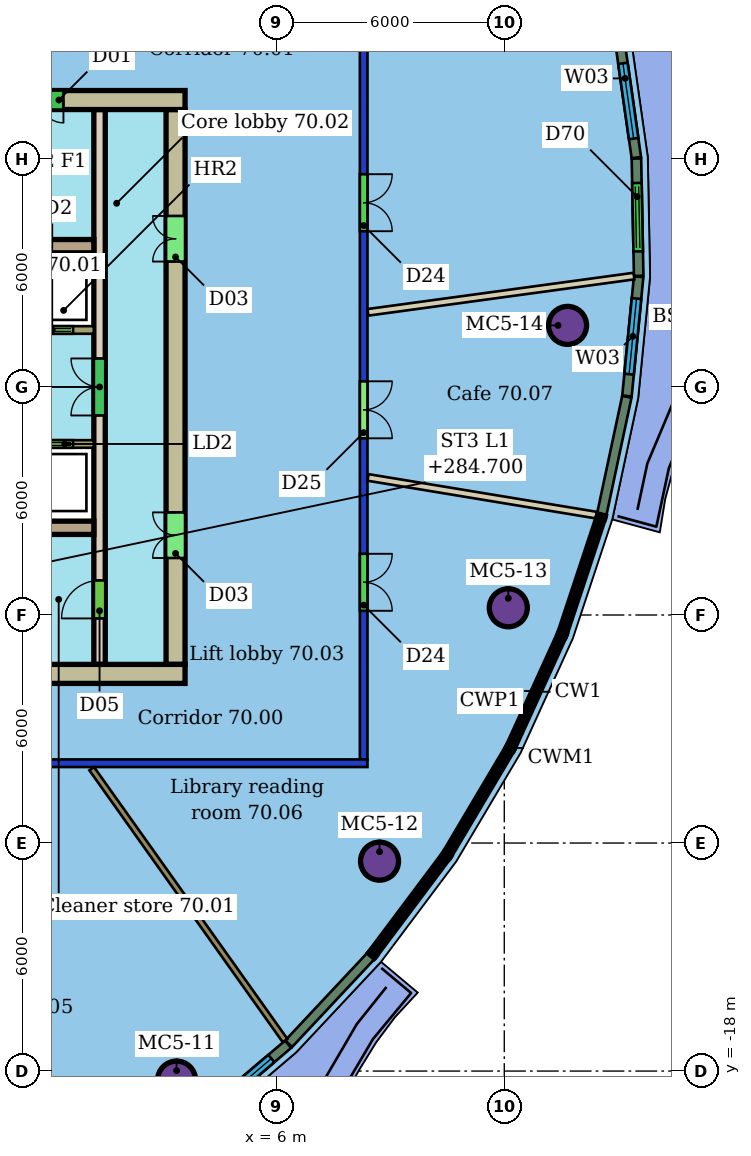
"""IFC4 building model, lengths in metres.
Left out: names, types, materials, properties, quantities, classifications, styles, units other than length and angle.
Written with IfcOpenShell. Run it as: python <this file> out.ifc"""

import sys

from ifc_helpers import new_model, si_unit, direction, frame, frame_2d, origin, origin_2d, place, context, subcontext, project, spatial, rectangle, hollow_circle, extrude, element, fill, save


model = new_model("IFC4")
c1 = context("Model", 3, precision=1e-05, world=origin(), true_north=direction((0.0, 1.0)))
c2 = subcontext(c1, "Body", "Model", "MODEL_VIEW")
j1 = project(units=[si_unit("LENGTHUNIT", "METRE"), si_unit("PLANEANGLEUNIT", "RADIAN")], contexts=[c1])
p1 = place(None, origin())
s1 = spatial("IfcSite", under=j1, at=p1, CompositionType="ELEMENT")
p2 = place(p1, origin())
s2 = spatial("IfcBuilding", under=s1, at=p2, CompositionType="ELEMENT")
p3 = place(p2, frame((0.0, 0.0, 282.9)))
s3 = spatial("IfcBuildingStorey", under=s2, at=p3, CompositionType="ELEMENT", Elevation=282.9)
for number, where, z_axis, x_axis in (
    (1, (3.377, -18.238, 0.0), (0.0, 0.0, 1.0), (1.0, 0.0, 0.0)),
    (2, (8.718, -12.477, 0.0), (0.0, 0.0, 1.0), (1.0, 0.0, 0.0)),
    (3, (12.106, -5.81, 0.0), (0.0, 0.0, 1.0), (1.0, 0.0, 0.0)),
    (4, (13.666, 1.62, 0.0), (0.0, 0.0, 1.0), (1.0, 0.0, 0.0)),
):
    element("IfcColumn", number, at=place(p3, frame(where, z_axis=z_axis, x_axis=x_axis)), inside=s3, PredefinedType="COLUMN", context=c2, shape_type="SweptSolid", body=[
        extrude(hollow_circle(Radius=0.5, WallThickness=0.04, at=origin_2d()), origin(), (0.0, 0.0, 1.0), 3.45),
    ])
p4 = place(p3, frame((8.4, -9.9, 0.0), z_axis=(0.0, 0.0, 1.0), x_axis=(-1.0, 0.0, 0.0)))
e5 = element("IfcWall", 5, at=p4, inside=s3, PredefinedType="PARTITIONING", context=c2, shape_type="SweptSolid", body=[
    extrude(rectangle(XDim=28.8, YDim=0.2, at=frame_2d((14.4, 0.0))), origin(), (0.0, 0.0, 1.0), 3.1),
])
p5 = place(p4, frame((17.579, 0.0, 0.0)))
e6 = element("IfcOpeningElement", 6, at=p5, cuts=e5, PredefinedType="OPENING", context=c2, shape_type="SweptSolid", body=[
    extrude(rectangle(XDim=1.5, YDim=2.4, at=frame_2d((0.75, 1.2))), frame((0.0, 0.11, 0.0), z_axis=(0.0, -1.0, 0.0), x_axis=(1.0, 0.0, 0.0)), (0.0, 0.0, 1.0), 0.22),
])
p6 = place(p4, frame((9.185, 0.0, 0.0)))
e7 = element("IfcOpeningElement", 7, at=p6, cuts=e5, PredefinedType="OPENING", context=c2, shape_type="SweptSolid", body=[
    extrude(rectangle(XDim=1.8, YDim=2.4, at=frame_2d((0.9, 1.2))), frame((0.0, 0.11, 0.0), z_axis=(0.0, -1.0, 0.0), x_axis=(1.0, 0.0, 0.0)), (0.0, 0.0, 1.0), 0.22),
])
p7 = place(p3, frame((8.3, 9.8, 0.0), z_axis=(0.0, 0.0, 1.0), x_axis=(0.0, -1.0, 0.0)))
e8 = element("IfcWall", 8, at=p7, inside=s3, PredefinedType="PARTITIONING", context=c2, shape_type="SweptSolid", body=[
    extrude(rectangle(XDim=19.6, YDim=0.2, at=frame_2d((9.8, 0.0))), origin(), (0.0, 0.0, 1.0), 3.1),
])
p8 = place(p7, frame((14.189, 0.0, 0.0)))
e9 = element("IfcOpeningElement", 9, at=p8, cuts=e8, PredefinedType="OPENING", context=c2, shape_type="SweptSolid", body=[
    extrude(rectangle(XDim=1.5, YDim=2.1, at=frame_2d((0.75, 1.05))), frame((0.0, 0.11, 0.0), z_axis=(0.0, -1.0, 0.0), x_axis=(1.0, 0.0, 0.0)), (0.0, 0.0, 1.0), 0.22),
])
p9 = place(p7, frame((9.651, 0.0, 0.0)))
e10 = element("IfcOpeningElement", 10, at=p9, cuts=e8, PredefinedType="OPENING", context=c2, shape_type="SweptSolid", body=[
    extrude(rectangle(XDim=1.5, YDim=2.4, at=frame_2d((0.75, 1.2))), frame((0.0, 0.11, 0.0), z_axis=(0.0, -1.0, 0.0), x_axis=(1.0, 0.0, 0.0)), (0.0, 0.0, 1.0), 0.22),
])
p10 = place(p7, frame((4.201, 0.0, 0.0)))
e11 = element("IfcOpeningElement", 11, at=p10, cuts=e8, PredefinedType="OPENING", context=c2, shape_type="SweptSolid", body=[
    extrude(rectangle(XDim=1.5, YDim=2.1, at=frame_2d((0.75, 1.05))), frame((0.0, 0.11, 0.0), z_axis=(0.0, -1.0, 0.0), x_axis=(1.0, 0.0, 0.0)), (0.0, 0.0, 1.0), 0.22),
])
p11 = place(p3, frame((6.232, -17.198, 0.0), z_axis=(0.0, 0.0, 1.0), x_axis=(-0.579606269786, 0.814896663402, 0.0)))
e12 = element("IfcWall", 12, at=p11, inside=s3, PredefinedType="PARTITIONING", context=c2, shape_type="SweptSolid", body=[
    extrude(rectangle(XDim=8.78, YDim=0.15, at=frame_2d((4.39, 0.0))), origin(), (0.0, 0.0, 1.0), 3.45),
])
p12 = place(p3, frame((14.432, -3.374, 0.0), z_axis=(0.0, 0.0, 1.0), x_axis=(-0.986640542302, 0.162912369961, 0.0)))
e13 = element("IfcWall", 13, at=p12, inside=s3, PredefinedType="PARTITIONING", context=c2, shape_type="SweptSolid", body=[
    extrude(rectangle(XDim=6.099, YDim=0.175, at=frame_2d((3.05, 0.0))), origin(), (0.0, 0.0, 1.0), 3.45),
])
p13 = place(p3, frame((15.412, 2.918, 0.0), z_axis=(0.0, 0.0, 1.0), x_axis=(-0.99084383144, -0.135012968627, 0.0)))
e14 = element("IfcWall", 14, at=p13, inside=s3, PredefinedType="PARTITIONING", context=c2, shape_type="SweptSolid", body=[
    extrude(rectangle(XDim=7.065, YDim=0.175, at=frame_2d((3.532, 0.0))), origin(), (0.0, 0.0, 1.0), 3.45),
])
p14 = place(p3, frame((3.908, -19.34, 0.0), z_axis=(0.0, 0.0, 1.0), x_axis=(0.761601165005, 0.64804603653, 0.0)))
e15 = element("IfcWall", 15, at=p14, inside=s3, PredefinedType="SOLIDWALL", context=c2, shape_type="SweptSolid", body=[
    extrude(rectangle(XDim=3.154, YDim=0.25, at=frame_2d((1.577, 0.0))), origin(), (0.0, 0.0, 1.0), 3.15),
])
p15 = place(p14, frame((0.577, 0.0, 0.9)))
e16 = element("IfcOpeningElement", 16, at=p15, cuts=e15, PredefinedType="OPENING", context=c2, shape_type="SweptSolid", body=[
    extrude(rectangle(XDim=2.0, YDim=2.1, at=frame_2d((1.0, 1.05))), frame((0.0, 0.135, 0.0), z_axis=(0.0, -1.0, 0.0), x_axis=(1.0, 0.0, 0.0)), (0.0, 0.0, 1.0), 0.27),
])
for number, where, z_axis, x_axis in (
    (17, (6.326, -17.281, 0.0), (0.0, 0.0, 1.0), (0.684, 0.73, 0.0)),
    (18, (14.564, -3.353, 0.0), (0.0, 0.0, 1.0), (0.209, 0.978, 0.0)),
):
    element("IfcWall", number, at=place(p3, frame(where, z_axis=z_axis, x_axis=x_axis)), inside=s3, PredefinedType="SOLIDWALL", context=c2, shape_type="SweptSolid", body=[
        extrude(rectangle(XDim=3.163, YDim=0.25, at=frame_2d((1.582, 0.0))), origin(), (0.0, 0.0, 1.0), 3.15),
    ])
p16 = place(p3, frame((15.228, -0.238, 0.0), z_axis=(0.0, 0.0, 1.0), x_axis=(0.097526326892, 0.995232945377, 0.0)))
e19 = element("IfcWall", 19, at=p16, inside=s3, PredefinedType="SOLIDWALL", context=c2, shape_type="SweptSolid", body=[
    extrude(rectangle(XDim=3.154, YDim=0.25, at=frame_2d((1.577, 0.0))), origin(), (0.0, 0.0, 1.0), 3.15),
])
p17 = place(p16, frame((0.577, 0.0, 0.9)))
e20 = element("IfcOpeningElement", 20, at=p17, cuts=e19, PredefinedType="OPENING", context=c2, shape_type="SweptSolid", body=[
    extrude(rectangle(XDim=2.0, YDim=2.1, at=frame_2d((1.0, 1.05))), frame((0.0, 0.135, 0.0), z_axis=(0.0, -1.0, 0.0), x_axis=(1.0, 0.0, 0.0)), (0.0, 0.0, 1.0), 0.27),
])
p18 = place(p3, frame((15.537, 2.924, 0.0), z_axis=(0.0, 0.0, 1.0), x_axis=(-0.019213534435, 0.999815403009, 0.0)))
e21 = element("IfcWall", 21, at=p18, inside=s3, PredefinedType="SOLIDWALL", context=c2, shape_type="SweptSolid", body=[
    extrude(rectangle(XDim=3.088, YDim=0.25, at=frame_2d((1.544, 0.0))), origin(), (0.0, 0.0, 1.0), 3.15),
])
p19 = place(p18, frame((0.644, 0.0, 0.0)))
e22 = element("IfcOpeningElement", 22, at=p19, cuts=e21, PredefinedType="OPENING", context=c2, shape_type="SweptSolid", body=[
    extrude(rectangle(XDim=1.8, YDim=2.4, at=frame_2d((0.9, 1.2))), frame((0.0, 0.135, 0.0), z_axis=(0.0, -1.0, 0.0), x_axis=(1.0, 0.0, 0.0)), (0.0, 0.0, 1.0), 0.27),
])
p20 = place(p3, frame((15.476, 6.034, 0.0), z_axis=(0.0, 0.0, 1.0), x_axis=(-0.140956080181, 0.990015850105, 0.0)))
e23 = element("IfcWall", 23, at=p20, inside=s3, PredefinedType="SOLIDWALL", context=c2, shape_type="SweptSolid", body=[
    extrude(rectangle(XDim=3.012, YDim=0.25, at=frame_2d((1.506, 0.0))), origin(), (0.0, 0.0, 1.0), 3.15),
])
p21 = place(p20, frame((0.506, 0.0, 0.9)))
e24 = element("IfcOpeningElement", 24, at=p21, cuts=e23, PredefinedType="OPENING", context=c2, shape_type="SweptSolid", body=[
    extrude(rectangle(XDim=2.0, YDim=2.1, at=frame_2d((1.0, 1.05))), frame((0.0, 0.135, 0.0), z_axis=(0.0, -1.0, 0.0), x_axis=(1.0, 0.0, 0.0)), (0.0, 0.0, 1.0), 0.27),
])
p22 = place(p3, frame((3.6, 7.55, 0.0), z_axis=(0.0, 0.0, 1.0), x_axis=(-1.0, 0.0, 0.0)))
e25 = element("IfcWall", 25, at=p22, inside=s3, PredefinedType="SHEAR", context=c2, shape_type="SweptSolid", body=[
    extrude(rectangle(XDim=9.6, YDim=0.5, at=frame_2d((4.8, 0.0))), origin(), (0.0, 0.0, 1.0), 3.3),
])
p23 = place(p22, frame((3.2, 0.0, 0.0)))
e26 = element("IfcOpeningElement", 26, at=p23, cuts=e25, PredefinedType="OPENING", context=c2, shape_type="SweptSolid", body=[
    extrude(rectangle(XDim=1.2, YDim=2.1, at=frame_2d((0.6, 1.05))), frame((0.0, 0.26, 0.0), z_axis=(0.0, -1.0, 0.0), x_axis=(1.0, 0.0, 0.0)), (0.0, 0.0, 1.0), 0.52),
])
p24 = place(p3, frame((-15.6, -7.55, 0.0), z_axis=(0.0, 0.0, 1.0), x_axis=(1.0, 0.0, 0.0)))
e27 = element("IfcWall", 27, at=p24, inside=s3, PredefinedType="SHEAR", context=c2, shape_type="SweptSolid", body=[
    extrude(rectangle(XDim=19.2, YDim=0.5, at=frame_2d((9.6, 0.0))), origin(), (0.0, 0.0, 1.0), 3.3),
])
p25 = place(p24, frame((3.6, 0.0, 0.0)))
e28 = element("IfcOpeningElement", 28, at=p25, cuts=e27, PredefinedType="OPENING", context=c2, shape_type="SweptSolid", body=[
    extrude(rectangle(XDim=1.2, YDim=2.1, at=frame_2d((0.6, 1.05))), frame((0.0, 0.26, 0.0), z_axis=(0.0, -1.0, 0.0), x_axis=(1.0, 0.0, 0.0)), (0.0, 0.0, 1.0), 0.52),
])
p26 = place(p3, frame((3.35, -7.3, 0.0), z_axis=(0.0, 0.0, 1.0), x_axis=(0.0, 1.0, 0.0)))
e29 = element("IfcWall", 29, at=p26, inside=s3, PredefinedType="SHEAR", context=c2, shape_type="SweptSolid", body=[
    extrude(rectangle(XDim=14.6, YDim=0.5, at=frame_2d((7.3, 0.0))), origin(), (0.0, 0.0, 1.0), 3.3),
])
p27 = place(p26, frame((2.8, 0.0, 0.0)))
e30 = element("IfcOpeningElement", 30, at=p27, cuts=e29, PredefinedType="OPENING", context=c2, shape_type="SweptSolid", body=[
    extrude(rectangle(XDim=1.2, YDim=2.1, at=frame_2d((0.6, 1.05))), frame((0.0, 0.26, 0.0), z_axis=(0.0, -1.0, 0.0), x_axis=(1.0, 0.0, 0.0)), (0.0, 0.0, 1.0), 0.52),
])
p28 = place(p26, frame((10.6, 0.0, 0.0)))
e31 = element("IfcOpeningElement", 31, at=p28, cuts=e29, PredefinedType="OPENING", context=c2, shape_type="SweptSolid", body=[
    extrude(rectangle(XDim=1.2, YDim=2.1, at=frame_2d((0.6, 1.05))), frame((0.0, 0.26, 0.0), z_axis=(0.0, -1.0, 0.0), x_axis=(1.0, 0.0, 0.0)), (0.0, 0.0, 1.0), 0.52),
])
for number, where, z_axis, x_axis in (
    (32, (-6.0, 3.705, 0.0), (0.0, 0.0, 1.0), (1.0, 0.0, 0.0)),
    (33, (-6.0, -3.705, 0.0), (0.0, 0.0, 1.0), (1.0, 0.0, 0.0)),
):
    element("IfcWall", number, at=place(p3, frame(where, z_axis=z_axis, x_axis=x_axis)), inside=s3, PredefinedType="SHEAR", context=c2, shape_type="SweptSolid", body=[
        extrude(rectangle(XDim=7.2, YDim=0.35, at=frame_2d((3.6, 0.0))), origin(), (0.0, 0.0, 1.0), 3.3),
    ])
p29 = place(p3, frame((1.35, -7.3, 0.0), z_axis=(0.0, 0.0, 1.0), x_axis=(0.0, 1.0, 0.0)))
e34 = element("IfcWall", 34, at=p29, inside=s3, PredefinedType="SHEAR", context=c2, shape_type="SweptSolid", body=[
    extrude(rectangle(XDim=14.6, YDim=0.3, at=frame_2d((7.3, 0.0))), origin(), (0.0, 0.0, 1.0), 3.3),
])
p30 = place(p29, frame((1.21, 0.0, 0.0)))
e35 = element("IfcOpeningElement", 35, at=p30, cuts=e34, PredefinedType="OPENING", context=c2, shape_type="SweptSolid", body=[
    extrude(rectangle(XDim=1.0, YDim=2.1, at=frame_2d((0.5, 1.05))), frame((0.0, 0.16, 0.0), z_axis=(0.0, -1.0, 0.0), x_axis=(1.0, 0.0, 0.0)), (0.0, 0.0, 1.0), 0.32),
])
p31 = place(p29, frame((6.55, 0.0, 0.0)))
e36 = element("IfcOpeningElement", 36, at=p31, cuts=e34, PredefinedType="OPENING", context=c2, shape_type="SweptSolid", body=[
    extrude(rectangle(XDim=1.5, YDim=2.1, at=frame_2d((0.75, 1.05))), frame((0.0, 0.16, 0.0), z_axis=(0.0, -1.0, 0.0), x_axis=(1.0, 0.0, 0.0)), (0.0, 0.0, 1.0), 0.32),
])
p32 = place(p3, frame((-13.2, 1.5, 0.0), z_axis=(0.0, 0.0, 1.0), x_axis=(1.0, 0.0, 0.0)))
e37 = element("IfcWall", 37, at=p32, inside=s3, PredefinedType="SHEAR", context=c2, shape_type="SweptSolid", body=[
    extrude(rectangle(XDim=14.4, YDim=0.2, at=frame_2d((7.2, 0.0))), origin(), (0.0, 0.0, 1.0), 3.3),
])
p33 = place(p32, frame((10.312, 0.0, 0.0)))
e38 = element("IfcOpeningElement", 38, at=p33, cuts=e37, PredefinedType="OPENING", context=c2, shape_type="SweptSolid", body=[
    extrude(rectangle(XDim=1.1, YDim=2.1, at=frame_2d((0.55, 1.05))), frame((0.0, 0.11, 0.0), z_axis=(0.0, -1.0, 0.0), x_axis=(1.0, 0.0, 0.0)), (0.0, 0.0, 1.0), 0.22),
])
p34 = place(p32, frame((12.754, 0.0, 0.0)))
e39 = element("IfcOpeningElement", 39, at=p34, cuts=e37, PredefinedType="OPENING", context=c2, shape_type="SweptSolid", body=[
    extrude(rectangle(XDim=1.1, YDim=2.1, at=frame_2d((0.55, 1.05))), frame((0.0, 0.11, 0.0), z_axis=(0.0, -1.0, 0.0), x_axis=(1.0, 0.0, 0.0)), (0.0, 0.0, 1.0), 0.22),
])
p35 = place(p32, frame((0.15, 0.0, 0.0)))
e40 = element("IfcOpeningElement", 40, at=p35, cuts=e37, PredefinedType="OPENING", context=c2, shape_type="SweptSolid", body=[
    extrude(rectangle(XDim=0.9, YDim=2.1, at=frame_2d((0.45, 1.05))), frame((0.0, 0.11, 0.0), z_axis=(0.0, -1.0, 0.0), x_axis=(1.0, 0.0, 0.0)), (0.0, 0.0, 1.0), 0.22),
])
p36 = place(p32, frame((4.222, 0.0, 0.0)))
e41 = element("IfcOpeningElement", 41, at=p36, cuts=e37, PredefinedType="OPENING", context=c2, shape_type="SweptSolid", body=[
    extrude(rectangle(XDim=0.9, YDim=2.1, at=frame_2d((0.45, 1.05))), frame((0.0, 0.11, 0.0), z_axis=(0.0, -1.0, 0.0), x_axis=(1.0, 0.0, 0.0)), (0.0, 0.0, 1.0), 0.22),
])
p37 = place(p32, frame((8.367, 0.0, 0.0)))
e42 = element("IfcOpeningElement", 42, at=p37, cuts=e37, PredefinedType="OPENING", context=c2, shape_type="SweptSolid", body=[
    extrude(rectangle(XDim=1.0, YDim=2.1, at=frame_2d((0.5, 1.05))), frame((0.0, 0.11, 0.0), z_axis=(0.0, -1.0, 0.0), x_axis=(1.0, 0.0, 0.0)), (0.0, 0.0, 1.0), 0.22),
])
p38 = place(p3, frame((1.2, -1.5, 0.0), z_axis=(0.0, 0.0, 1.0), x_axis=(-1.0, 0.0, 0.0)))
e43 = element("IfcWall", 43, at=p38, inside=s3, PredefinedType="SHEAR", context=c2, shape_type="SweptSolid", body=[
    extrude(rectangle(XDim=14.4, YDim=0.2, at=frame_2d((7.2, 0.0))), origin(), (0.0, 0.0, 1.0), 3.3),
])
p39 = place(p38, frame((7.821, 0.0, 0.0)))
e44 = element("IfcOpeningElement", 44, at=p39, cuts=e43, PredefinedType="OPENING", context=c2, shape_type="SweptSolid", body=[
    extrude(rectangle(XDim=1.2, YDim=2.1, at=frame_2d((0.6, 1.05))), frame((0.0, 0.11, 0.0), z_axis=(0.0, -1.0, 0.0), x_axis=(1.0, 0.0, 0.0)), (0.0, 0.0, 1.0), 0.22),
])
p40 = place(p38, frame((0.546, 0.0, 0.0)))
e45 = element("IfcOpeningElement", 45, at=p40, cuts=e43, PredefinedType="OPENING", context=c2, shape_type="SweptSolid", body=[
    extrude(rectangle(XDim=1.1, YDim=2.1, at=frame_2d((0.55, 1.05))), frame((0.0, 0.11, 0.0), z_axis=(0.0, -1.0, 0.0), x_axis=(1.0, 0.0, 0.0)), (0.0, 0.0, 1.0), 0.22),
])
p41 = place(p38, frame((4.335, 0.0, 0.0)))
e46 = element("IfcOpeningElement", 46, at=p41, cuts=e43, PredefinedType="OPENING", context=c2, shape_type="SweptSolid", body=[
    extrude(rectangle(XDim=1.0, YDim=2.1, at=frame_2d((0.5, 1.05))), frame((0.0, 0.11, 0.0), z_axis=(0.0, -1.0, 0.0), x_axis=(1.0, 0.0, 0.0)), (0.0, 0.0, 1.0), 0.22),
])
p42 = place(p38, frame((2.592, 0.0, 0.0)))
e47 = element("IfcOpeningElement", 47, at=p42, cuts=e43, PredefinedType="OPENING", context=c2, shape_type="SweptSolid", body=[
    extrude(rectangle(XDim=1.0, YDim=2.1, at=frame_2d((0.5, 1.05))), frame((0.0, 0.11, 0.0), z_axis=(0.0, -1.0, 0.0), x_axis=(1.0, 0.0, 0.0)), (0.0, 0.0, 1.0), 0.22),
])
p43 = place(p8, origin())
e48 = element("IfcDoor", 48, at=p43, inside=s3, OperationType="DOUBLE_DOOR_SINGLE_SWING", PredefinedType="DOOR", context=c2, shape_type="SweptSolid", body=[
    extrude(rectangle(XDim=1.5, YDim=2.1, at=frame_2d((0.75, 1.05))), frame((0.0, 0.025, 0.0), z_axis=(0.0, -1.0, 0.0), x_axis=(1.0, 0.0, 0.0)), (0.0, 0.0, 1.0), 0.05),
])
fill(e9, e48)
p44 = place(p9, origin())
e49 = element("IfcDoor", 49, at=p44, inside=s3, OperationType="DOUBLE_DOOR_SINGLE_SWING", PredefinedType="DOOR", context=c2, shape_type="SweptSolid", body=[
    extrude(rectangle(XDim=1.5, YDim=2.4, at=frame_2d((0.75, 1.2))), frame((0.0, 0.025, 0.0), z_axis=(0.0, -1.0, 0.0), x_axis=(1.0, 0.0, 0.0)), (0.0, 0.0, 1.0), 0.05),
])
fill(e10, e49)
p45 = place(p10, origin())
e50 = element("IfcDoor", 50, at=p45, inside=s3, OperationType="DOUBLE_DOOR_SINGLE_SWING", PredefinedType="DOOR", context=c2, shape_type="SweptSolid", body=[
    extrude(rectangle(XDim=1.5, YDim=2.1, at=frame_2d((0.75, 1.05))), frame((0.0, 0.025, 0.0), z_axis=(0.0, -1.0, 0.0), x_axis=(1.0, 0.0, 0.0)), (0.0, 0.0, 1.0), 0.05),
])
fill(e11, e50)
p46 = place(p15, origin())
e51 = element("IfcWindow", 51, at=p46, inside=s3, PartitioningType="SINGLE_PANEL", PredefinedType="WINDOW", context=c2, shape_type="SweptSolid", body=[
    extrude(rectangle(XDim=2.0, YDim=2.1, at=frame_2d((1.0, 1.05))), frame((0.0, 0.03, 0.0), z_axis=(0.0, -1.0, 0.0), x_axis=(1.0, 0.0, 0.0)), (0.0, 0.0, 1.0), 0.06),
])
fill(e16, e51)
p47 = place(p17, origin())
e52 = element("IfcWindow", 52, at=p47, inside=s3, PartitioningType="SINGLE_PANEL", PredefinedType="WINDOW", context=c2, shape_type="SweptSolid", body=[
    extrude(rectangle(XDim=2.0, YDim=2.1, at=frame_2d((1.0, 1.05))), frame((0.0, 0.03, 0.0), z_axis=(0.0, -1.0, 0.0), x_axis=(1.0, 0.0, 0.0)), (0.0, 0.0, 1.0), 0.06),
])
fill(e20, e52)
p48 = place(p19, origin())
e53 = element("IfcDoor", 53, at=p48, inside=s3, OperationType="DOUBLE_DOOR_SLIDING", PredefinedType="DOOR", context=c2, shape_type="SweptSolid", body=[
    extrude(rectangle(XDim=1.8, YDim=2.4, at=frame_2d((0.9, 1.2))), frame((0.0, 0.025, 0.0), z_axis=(0.0, -1.0, 0.0), x_axis=(1.0, 0.0, 0.0)), (0.0, 0.0, 1.0), 0.05),
])
fill(e22, e53)
p49 = place(p21, origin())
e54 = element("IfcWindow", 54, at=p49, inside=s3, PartitioningType="SINGLE_PANEL", PredefinedType="WINDOW", context=c2, shape_type="SweptSolid", body=[
    extrude(rectangle(XDim=2.0, YDim=2.1, at=frame_2d((1.0, 1.05))), frame((0.0, 0.03, 0.0), z_axis=(0.0, -1.0, 0.0), x_axis=(1.0, 0.0, 0.0)), (0.0, 0.0, 1.0), 0.06),
])
fill(e24, e54)
p50 = place(p23, origin())
e55 = element("IfcDoor", 55, at=p50, inside=s3, OperationType="DOUBLE_DOOR_SINGLE_SWING", PredefinedType="NOTDEFINED", context=c2, shape_type="SweptSolid", body=[
    extrude(rectangle(XDim=1.2, YDim=2.1, at=frame_2d((0.6, 1.05))), frame((0.0, 0.025, 0.0), z_axis=(0.0, -1.0, 0.0), x_axis=(1.0, 0.0, 0.0)), (0.0, 0.0, 1.0), 0.05),
])
fill(e26, e55)
p51 = place(p27, origin())
e56 = element("IfcDoor", 56, at=p51, inside=s3, OperationType="DOUBLE_DOOR_SINGLE_SWING", PredefinedType="NOTDEFINED", context=c2, shape_type="SweptSolid", body=[
    extrude(rectangle(XDim=1.2, YDim=2.1, at=frame_2d((0.6, 1.05))), frame((0.0, 0.025, 0.0), z_axis=(0.0, -1.0, 0.0), x_axis=(1.0, 0.0, 0.0)), (0.0, 0.0, 1.0), 0.05),
])
fill(e30, e56)
p52 = place(p28, origin())
e57 = element("IfcDoor", 57, at=p52, inside=s3, OperationType="DOUBLE_DOOR_SINGLE_SWING", PredefinedType="NOTDEFINED", context=c2, shape_type="SweptSolid", body=[
    extrude(rectangle(XDim=1.2, YDim=2.1, at=frame_2d((0.6, 1.05))), frame((0.0, 0.025, 0.0), z_axis=(0.0, -1.0, 0.0), x_axis=(1.0, 0.0, 0.0)), (0.0, 0.0, 1.0), 0.05),
])
fill(e31, e57)
p53 = place(p30, origin())
e58 = element("IfcDoor", 58, at=p53, inside=s3, OperationType="SINGLE_SWING_LEFT", PredefinedType="NOTDEFINED", context=c2, shape_type="SweptSolid", body=[
    extrude(rectangle(XDim=1.0, YDim=2.1, at=frame_2d((0.5, 1.05))), frame((0.0, 0.025, 0.0), z_axis=(0.0, -1.0, 0.0), x_axis=(1.0, 0.0, 0.0)), (0.0, 0.0, 1.0), 0.05),
])
fill(e35, e58)
p54 = place(p31, origin())
e59 = element("IfcDoor", 59, at=p54, inside=s3, OperationType="DOUBLE_DOOR_SINGLE_SWING", PredefinedType="NOTDEFINED", context=c2, shape_type="SweptSolid", body=[
    extrude(rectangle(XDim=1.5, YDim=2.1, at=frame_2d((0.75, 1.05))), frame((0.0, 0.025, 0.0), z_axis=(0.0, -1.0, 0.0), x_axis=(1.0, 0.0, 0.0)), (0.0, 0.0, 1.0), 0.05),
])
fill(e36, e59)
p55 = place(p34, origin())
e60 = element("IfcDoor", 60, at=p55, inside=s3, OperationType="DOUBLE_DOOR_SLIDING", PredefinedType="NOTDEFINED", context=c2, shape_type="SweptSolid", body=[
    extrude(rectangle(XDim=1.1, YDim=2.1, at=frame_2d((0.55, 1.05))), frame((0.0, 0.025, 0.0), z_axis=(0.0, -1.0, 0.0), x_axis=(1.0, 0.0, 0.0)), (0.0, 0.0, 1.0), 0.05),
])
fill(e39, e60)
p56 = place(p40, origin())
e61 = element("IfcDoor", 61, at=p56, inside=s3, OperationType="DOUBLE_DOOR_SLIDING", PredefinedType="NOTDEFINED", context=c2, shape_type="SweptSolid", body=[
    extrude(rectangle(XDim=1.1, YDim=2.1, at=frame_2d((0.55, 1.05))), frame((0.0, 0.025, 0.0), z_axis=(0.0, -1.0, 0.0), x_axis=(1.0, 0.0, 0.0)), (0.0, 0.0, 1.0), 0.05),
])
fill(e45, e61)
save(model, sys.argv[1])
